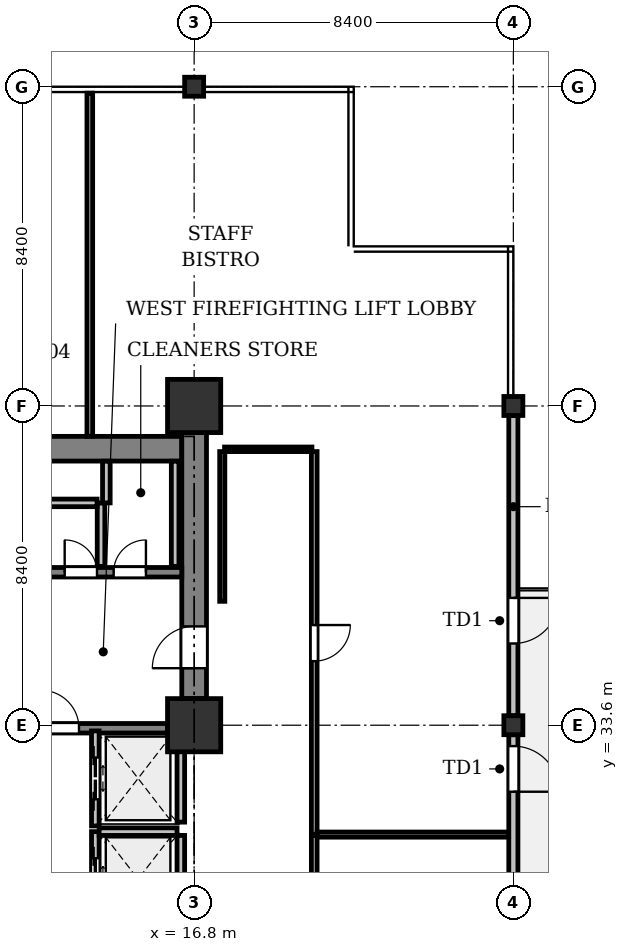
"""IFC4 building model, lengths in metres.
Left out: names, types, materials, properties, quantities, classifications, styles, units other than length and angle.
Written with IfcOpenShell. Run it as: python <this file> out.ifc"""

import sys

from ifc_helpers import new_model, si_unit, direction, frame, frame_2d, origin, origin_2d, place, context, subcontext, project, spatial, rectangle, i_section, extrude, element, fill, save


model = new_model("IFC4")
c1 = context("Model", 3, precision=1e-05, world=origin(), true_north=direction((0.0, 1.0)))
c2 = subcontext(c1, "Body", "Model", "MODEL_VIEW")
j1 = project(units=[si_unit("LENGTHUNIT", "METRE"), si_unit("PLANEANGLEUNIT", "RADIAN")], contexts=[c1])
p1 = place(None, origin())
s1 = spatial("IfcSite", under=j1, at=p1, CompositionType="ELEMENT")
p2 = place(p1, origin())
s2 = spatial("IfcBuilding", under=s1, at=p2, CompositionType="ELEMENT")
p3 = place(p2, frame((0.0, 0.0, 50.0)))
s3 = spatial("IfcBuildingStorey", under=s2, at=p3, CompositionType="ELEMENT", Elevation=50.0)
for number, where, z_axis, x_axis in (
    (1, (16.8, 33.6, 0.0), (0.0, 0.0, 1.0), (1.0, 0.0, 0.0)),
    (2, (16.8, 42.0, 0.0), (0.0, 0.0, 1.0), (1.0, 0.0, 0.0)),
):
    element("IfcColumn", number, at=place(p3, frame(where, z_axis=z_axis, x_axis=x_axis)), inside=s3, PredefinedType="COLUMN", context=c2, shape_type="SweptSolid", body=[
        extrude(rectangle(XDim=1.4, YDim=1.4, at=origin_2d()), origin(), (0.0, 0.0, 1.0), 4.2),
    ])
for number, where, z_axis, x_axis in (
    (3, (16.8, 50.4, 0.0), (0.0, 0.0, 1.0), (1.0, 0.0, 0.0)),
    (4, (25.2, 33.6, 0.0), (0.0, 0.0, 1.0), (1.0, 0.0, 0.0)),
    (5, (25.2, 42.0, 0.0), (0.0, 0.0, 1.0), (1.0, 0.0, 0.0)),
):
    element("IfcColumn", number, at=place(p3, frame(where, z_axis=z_axis, x_axis=x_axis)), inside=s3, PredefinedType="COLUMN", context=c2, shape_type="SweptSolid", body=[
        extrude(i_section(OverallWidth=0.5, OverallDepth=0.5, WebThickness=0.028, FlangeThickness=0.04, at=origin_2d()), origin(), (0.0, 0.0, 1.0), 4.2),
    ])
p4 = place(p3, frame((25.2, 41.75, 0.0), z_axis=(0.0, 0.0, 1.0), x_axis=(0.0, -1.0, 0.0)))
e6 = element("IfcWall", 6, at=p4, inside=s3, PredefinedType="STANDARD", context=c2, shape_type="SweptSolid", body=[
    extrude(rectangle(XDim=7.9, YDim=0.24, at=frame_2d((3.95, 0.0))), origin(), (0.0, 0.0, 1.0), 3.471),
])
p5 = place(p4, frame((4.8, 0.0, 0.0)))
e7 = element("IfcOpeningElement", 7, at=p5, cuts=e6, PredefinedType="OPENING", context=c2, shape_type="SweptSolid", body=[
    extrude(rectangle(XDim=1.2, YDim=2.2, at=frame_2d((0.6, 1.1))), frame((0.0, 0.13, 0.0), z_axis=(0.0, -1.0, 0.0), x_axis=(1.0, 0.0, 0.0)), (0.0, 0.0, 1.0), 0.26),
])
p6 = place(p3, frame((25.2, 33.35, 0.0), z_axis=(0.0, 0.0, 1.0), x_axis=(0.0, -1.0, 0.0)))
e8 = element("IfcWall", 8, at=p6, inside=s3, PredefinedType="STANDARD", context=c2, shape_type="SweptSolid", body=[
    extrude(rectangle(XDim=7.9, YDim=0.24, at=frame_2d((3.95, 0.0))), origin(), (0.0, 0.0, 1.0), 3.471),
])
p7 = place(p6, frame((0.3, 0.0, 0.0)))
e9 = element("IfcOpeningElement", 9, at=p7, cuts=e8, PredefinedType="OPENING", context=c2, shape_type="SweptSolid", body=[
    extrude(rectangle(XDim=1.2, YDim=2.2, at=frame_2d((0.6, 1.1))), frame((0.0, 0.13, 0.0), z_axis=(0.0, -1.0, 0.0), x_axis=(1.0, 0.0, 0.0)), (0.0, 0.0, 1.0), 0.26),
])
p8 = place(p6, frame((4.329, 0.0, 0.9)))
e10 = element("IfcOpeningElement", 10, at=p8, cuts=e8, PredefinedType="OPENING", context=c2, shape_type="SweptSolid", body=[
    extrude(rectangle(XDim=1.8, YDim=1.6, at=frame_2d((0.9, 0.8))), frame((0.0, 0.13, 0.0), z_axis=(0.0, -1.0, 0.0), x_axis=(1.0, 0.0, 0.0)), (0.0, 0.0, 1.0), 0.26),
])
p9 = place(p3, frame((8.725, 40.875, 0.0), z_axis=(0.0, 0.0, 1.0), x_axis=(1.0, 0.0, 0.0)))
e11 = element("IfcWall", 11, at=p9, inside=s3, PredefinedType="SHEAR", context=c2, shape_type="SweptSolid", body=[
    extrude(rectangle(XDim=7.75, YDim=0.65, at=frame_2d((3.875, 0.0))), origin(), (0.0, 0.0, 1.0), 3.925),
])
p10 = place(p3, frame((16.8, 34.3, 0.0), z_axis=(0.0, 0.0, 1.0), x_axis=(0.0, 1.0, 0.0)))
e12 = element("IfcWall", 12, at=p10, inside=s3, PredefinedType="SHEAR", context=c2, shape_type="SweptSolid", body=[
    extrude(rectangle(XDim=7.0, YDim=0.65, at=frame_2d((3.5, 0.0))), origin(), (0.0, 0.0, 1.0), 3.925),
])
p11 = place(p10, frame((0.8, 0.0, 0.0)))
e13 = element("IfcOpeningElement", 13, at=p11, cuts=e12, PredefinedType="OPENING", context=c2, shape_type="SweptSolid", body=[
    extrude(rectangle(XDim=1.1, YDim=2.15, at=frame_2d((0.55, 1.075))), frame((0.0, 0.335, 0.0), z_axis=(0.0, -1.0, 0.0), x_axis=(1.0, 0.0, 0.0)), (0.0, 0.0, 1.0), 0.67),
])
p12 = place(p3, frame((12.45, 33.52, 0.0), z_axis=(0.0, 0.0, 1.0), x_axis=(1.0, 0.0, 0.0)))
e14 = element("IfcWall", 14, at=p12, inside=s3, PredefinedType="SHEAR", context=c2, shape_type="SweptSolid", body=[
    extrude(rectangle(XDim=3.65, YDim=0.25, at=frame_2d((1.825, 0.0))), origin(), (0.0, 0.0, 1.0), 3.925),
])
p13 = place(p12, frame((0.32, 0.0, 0.0)))
e15 = element("IfcOpeningElement", 15, at=p13, cuts=e14, PredefinedType="OPENING", context=c2, shape_type="SweptSolid", body=[
    extrude(rectangle(XDim=1.0, YDim=2.15, at=frame_2d((0.5, 1.075))), frame((0.0, 0.135, 0.0), z_axis=(0.0, -1.0, 0.0), x_axis=(1.0, 0.0, 0.0)), (0.0, 0.0, 1.0), 0.27),
])
p14 = place(p3, frame((12.45, 37.625, 0.0), z_axis=(0.0, 0.0, 1.0), x_axis=(1.0, 0.0, 0.0)))
e16 = element("IfcWall", 16, at=p14, inside=s3, PredefinedType="SHEAR", context=c2, shape_type="SweptSolid", body=[
    extrude(rectangle(XDim=4.025, YDim=0.25, at=frame_2d((2.013, 0.0))), origin(), (0.0, 0.0, 1.0), 3.925),
])
p15 = place(p14, frame((0.944, 0.0, 0.0)))
e17 = element("IfcOpeningElement", 17, at=p15, cuts=e16, PredefinedType="OPENING", context=c2, shape_type="SweptSolid", body=[
    extrude(rectangle(XDim=0.85, YDim=2.15, at=frame_2d((0.425, 1.075))), frame((0.0, 0.135, 0.0), z_axis=(0.0, -1.0, 0.0), x_axis=(1.0, 0.0, 0.0)), (0.0, 0.0, 1.0), 0.27),
])
p16 = place(p14, frame((2.231, 0.0, 0.0)))
e18 = element("IfcOpeningElement", 18, at=p16, cuts=e16, PredefinedType="OPENING", context=c2, shape_type="SweptSolid", body=[
    extrude(rectangle(XDim=0.85, YDim=2.15, at=frame_2d((0.425, 1.075))), frame((0.0, 0.135, 0.0), z_axis=(0.0, -1.0, 0.0), x_axis=(1.0, 0.0, 0.0)), (0.0, 0.0, 1.0), 0.27),
])
p17 = place(p3, frame((14.2, 28.3, 0.0), z_axis=(0.0, 0.0, 1.0), x_axis=(0.0, 1.0, 0.0)))
e19 = element("IfcWall", 19, at=p17, inside=s3, PredefinedType="PARTITIONING", context=c2, shape_type="SweptSolid", body=[
    extrude(rectangle(XDim=2.5, YDim=0.2, at=frame_2d((1.25, 0.0))), origin(), (0.0, 0.0, 1.0), 3.925),
])
p18 = place(p17, frame((0.7, 0.0, 0.0)))
e20 = element("IfcOpeningElement", 20, at=p18, cuts=e19, PredefinedType="OPENING", context=c2, shape_type="SweptSolid", body=[
    extrude(rectangle(XDim=1.1, YDim=2.2, at=frame_2d((0.55, 1.1))), frame((0.0, 0.11, 0.0), z_axis=(0.0, -1.0, 0.0), x_axis=(1.0, 0.0, 0.0)), (0.0, 0.0, 1.0), 0.22),
])
p19 = place(p3, frame((16.45, 28.4, 0.0), z_axis=(0.0, 0.0, 1.0), x_axis=(0.0, 1.0, 0.0)))
e21 = element("IfcWall", 21, at=p19, inside=s3, PredefinedType="PARTITIONING", context=c2, shape_type="SweptSolid", body=[
    extrude(rectangle(XDim=2.3, YDim=0.2, at=frame_2d((1.15, 0.0))), origin(), (0.0, 0.0, 1.0), 3.925),
])
p20 = place(p3, frame((14.3, 30.8, 0.0), z_axis=(0.0, 0.0, 1.0), x_axis=(1.0, 0.0, 0.0)))
e22 = element("IfcWall", 22, at=p20, inside=s3, PredefinedType="PARTITIONING", context=c2, shape_type="SweptSolid", body=[
    extrude(rectangle(XDim=2.05, YDim=0.2, at=frame_2d((1.025, 0.0))), origin(), (0.0, 0.0, 1.0), 3.925),
])
p21 = place(p3, frame((14.2, 30.95, 0.0), z_axis=(0.0, 0.0, 1.0), x_axis=(0.0, 1.0, 0.0)))
e23 = element("IfcWall", 23, at=p21, inside=s3, PredefinedType="PARTITIONING", context=c2, shape_type="SweptSolid", body=[
    extrude(rectangle(XDim=2.5, YDim=0.2, at=frame_2d((1.25, 0.0))), origin(), (0.0, 0.0, 1.0), 3.925),
])
p22 = place(p21, frame((0.7, 0.0, 0.0)))
e24 = element("IfcOpeningElement", 24, at=p22, cuts=e23, PredefinedType="OPENING", context=c2, shape_type="SweptSolid", body=[
    extrude(rectangle(XDim=1.1, YDim=2.2, at=frame_2d((0.55, 1.1))), frame((0.0, 0.11, 0.0), z_axis=(0.0, -1.0, 0.0), x_axis=(1.0, 0.0, 0.0)), (0.0, 0.0, 1.0), 0.22),
])
p23 = place(p3, frame((16.45, 31.05, 0.0), z_axis=(0.0, 0.0, 1.0), x_axis=(0.0, 1.0, 0.0)))
e25 = element("IfcWall", 25, at=p23, inside=s3, PredefinedType="PARTITIONING", context=c2, shape_type="SweptSolid", body=[
    extrude(rectangle(XDim=2.3, YDim=0.2, at=frame_2d((1.15, 0.0))), origin(), (0.0, 0.0, 1.0), 3.925),
])
p24 = place(p3, frame((14.35, 37.78, 0.0), z_axis=(0.0, 0.0, 1.0), x_axis=(0.0, 1.0, 0.0)))
e26 = element("IfcWall", 26, at=p24, inside=s3, PredefinedType="PARTITIONING", context=c2, shape_type="SweptSolid", body=[
    extrude(rectangle(XDim=1.67, YDim=0.2, at=frame_2d((0.835, 0.0))), origin(), (0.0, 0.0, 1.0), 2.825),
])
p25 = place(p3, frame((14.246, 39.45, 0.0), z_axis=(0.0, 0.0, 1.0), x_axis=(-1.0, 0.0, 0.0)))
e27 = element("IfcWall", 27, at=p25, inside=s3, PredefinedType="PARTITIONING", context=c2, shape_type="SweptSolid", body=[
    extrude(rectangle(XDim=1.796, YDim=0.2, at=frame_2d((0.898, 0.0))), origin(), (0.0, 0.0, 1.0), 2.825),
])
p26 = place(p3, frame((16.3, 37.78, 0.0), z_axis=(0.0, 0.0, 1.0), x_axis=(0.0, 1.0, 0.0)))
e28 = element("IfcWall", 28, at=p26, inside=s3, PredefinedType="PARTITIONING", context=c2, shape_type="SweptSolid", body=[
    extrude(rectangle(XDim=2.766, YDim=0.2, at=frame_2d((1.383, 0.0))), origin(), (0.0, 0.0, 1.0), 2.825),
])
p27 = place(p3, frame((14.49, 40.546, 0.0), z_axis=(0.0, 0.0, 1.0), x_axis=(0.0, -1.0, 0.0)))
e29 = element("IfcWall", 29, at=p27, inside=s3, PredefinedType="PARTITIONING", context=c2, shape_type="SweptSolid", body=[
    extrude(rectangle(XDim=1.096, YDim=0.2, at=frame_2d((0.548, 0.0))), origin(), (0.0, 0.0, 1.0), 2.825),
])
p28 = place(p3, frame((19.96, 40.8, 0.0), z_axis=(0.0, 0.0, 1.0), x_axis=(0.0, -1.0, 0.0)))
e30 = element("IfcWall", 30, at=p28, inside=s3, PredefinedType="PARTITIONING", context=c2, shape_type="SweptSolid", body=[
    extrude(rectangle(XDim=10.078, YDim=0.15, at=frame_2d((5.039, 0.0))), origin(), (0.0, 0.0, 1.0), 3.313),
])
p29 = place(p28, frame((4.564, 0.0, 0.0)))
e31 = element("IfcOpeningElement", 31, at=p29, cuts=e30, PredefinedType="OPENING", context=c2, shape_type="SweptSolid", body=[
    extrude(rectangle(XDim=0.95, YDim=2.15, at=frame_2d((0.475, 1.075))), frame((0.0, 0.085, 0.0), z_axis=(0.0, -1.0, 0.0), x_axis=(1.0, 0.0, 0.0)), (0.0, 0.0, 1.0), 0.17),
])
p30 = place(p3, frame((20.039, 30.722, 0.0), z_axis=(0.0, 0.0, 1.0), x_axis=(1.0, 0.0, 0.0)))
e32 = element("IfcWall", 32, at=p30, inside=s3, PredefinedType="PARTITIONING", context=c2, shape_type="SweptSolid", body=[
    extrude(rectangle(XDim=5.037, YDim=0.135, at=frame_2d((2.519, 0.0))), origin(), (0.0, 0.0, 1.0), 3.566),
])
p31 = place(p3, frame((14.055, 50.231, 0.0), z_axis=(0.0, 0.0, 1.0), x_axis=(0.0, -1.0, 0.0)))
e33 = element("IfcWall", 33, at=p31, inside=s3, PredefinedType="PARTITIONING", context=c2, shape_type="SweptSolid", body=[
    extrude(rectangle(XDim=9.027, YDim=0.15, at=frame_2d((4.513, 0.0))), origin(), (0.0, 0.0, 1.0), 3.313),
])
p32 = place(p3, frame((17.54, 36.86, 0.0), z_axis=(0.0, 0.0, 1.0), x_axis=(0.0, 1.0, 0.0)))
e34 = element("IfcWall", 34, at=p32, inside=s3, PredefinedType="PARTITIONING", context=c2, shape_type="SweptSolid", body=[
    extrude(rectangle(XDim=3.94, YDim=0.135, at=frame_2d((1.97, 0.0))), origin(), (0.0, 0.0, 1.0), 3.925),
])
p33 = place(p3, frame((17.6, 40.86, 0.0), z_axis=(0.0, 0.0, 1.0), x_axis=(1.0, 0.0, 0.0)))
e35 = element("IfcWall", 35, at=p33, inside=s3, PredefinedType="PARTITIONING", context=c2, shape_type="SweptSolid", body=[
    extrude(rectangle(XDim=2.3, YDim=0.12, at=frame_2d((1.15, 0.0))), origin(), (0.0, 0.0, 1.0), 3.925),
])
p34 = place(p3, frame((19.96, 30.702, 0.0), z_axis=(0.0, 0.0, 1.0), x_axis=(0.0, -1.0, 0.0)))
e36 = element("IfcWall", 36, at=p34, inside=s3, PredefinedType="PARTITIONING", context=c2, shape_type="SweptSolid", body=[
    extrude(rectangle(XDim=10.392, YDim=0.15, at=frame_2d((5.196, 0.0))), origin(), (0.0, 0.0, 1.0), 3.313),
])
p35 = place(p5, origin())
e37 = element("IfcDoor", 37, at=p35, inside=s3, OperationType="SINGLE_SWING_LEFT", PredefinedType="DOOR", context=c2, shape_type="SweptSolid", body=[
    extrude(rectangle(XDim=1.2, YDim=2.2, at=frame_2d((0.6, 1.1))), frame((0.0, 0.025, 0.0), z_axis=(0.0, -1.0, 0.0), x_axis=(1.0, 0.0, 0.0)), (0.0, 0.0, 1.0), 0.05),
])
fill(e7, e37)
p36 = place(p7, origin())
e38 = element("IfcDoor", 38, at=p36, inside=s3, OperationType="SINGLE_SWING_RIGHT", PredefinedType="DOOR", context=c2, shape_type="SweptSolid", body=[
    extrude(rectangle(XDim=1.2, YDim=2.2, at=frame_2d((0.6, 1.1))), frame((0.0, 0.025, 0.0), z_axis=(0.0, -1.0, 0.0), x_axis=(1.0, 0.0, 0.0)), (0.0, 0.0, 1.0), 0.05),
])
fill(e9, e38)
p37 = place(p11, origin())
e39 = element("IfcDoor", 39, at=p37, inside=s3, OperationType="SINGLE_SWING_LEFT", PredefinedType="DOOR", context=c2, shape_type="SweptSolid", body=[
    extrude(rectangle(XDim=1.1, YDim=2.15, at=frame_2d((0.55, 1.075))), frame((0.0, 0.025, 0.0), z_axis=(0.0, -1.0, 0.0), x_axis=(1.0, 0.0, 0.0)), (0.0, 0.0, 1.0), 0.05),
])
fill(e13, e39)
p38 = place(p13, origin())
e40 = element("IfcDoor", 40, at=p38, inside=s3, OperationType="SINGLE_SWING_LEFT", PredefinedType="DOOR", context=c2, shape_type="SweptSolid", body=[
    extrude(rectangle(XDim=1.0, YDim=2.15, at=frame_2d((0.5, 1.075))), frame((0.0, 0.025, 0.0), z_axis=(0.0, -1.0, 0.0), x_axis=(1.0, 0.0, 0.0)), (0.0, 0.0, 1.0), 0.05),
])
fill(e15, e40)
p39 = place(p18, origin())
e41 = element("IfcDoor", 41, at=p39, inside=s3, OperationType="DOUBLE_DOOR_SLIDING", PredefinedType="DOOR", context=c2, shape_type="SweptSolid", body=[
    extrude(rectangle(XDim=1.1, YDim=2.2, at=frame_2d((0.55, 1.1))), frame((0.0, 0.025, 0.0), z_axis=(0.0, -1.0, 0.0), x_axis=(1.0, 0.0, 0.0)), (0.0, 0.0, 1.0), 0.05),
])
fill(e20, e41)
p40 = place(p22, origin())
e42 = element("IfcDoor", 42, at=p40, inside=s3, OperationType="DOUBLE_DOOR_SLIDING", PredefinedType="DOOR", context=c2, shape_type="SweptSolid", body=[
    extrude(rectangle(XDim=1.1, YDim=2.2, at=frame_2d((0.55, 1.1))), frame((0.0, 0.025, 0.0), z_axis=(0.0, -1.0, 0.0), x_axis=(1.0, 0.0, 0.0)), (0.0, 0.0, 1.0), 0.05),
])
fill(e24, e42)
p41 = place(p15, origin())
e43 = element("IfcDoor", 43, at=p41, inside=s3, OperationType="SINGLE_SWING_LEFT", PredefinedType="DOOR", context=c2, shape_type="SweptSolid", body=[
    extrude(rectangle(XDim=0.85, YDim=2.15, at=frame_2d((0.425, 1.075))), frame((0.0, 0.025, 0.0), z_axis=(0.0, -1.0, 0.0), x_axis=(1.0, 0.0, 0.0)), (0.0, 0.0, 1.0), 0.05),
])
fill(e17, e43)
p42 = place(p16, origin())
e44 = element("IfcDoor", 44, at=p42, inside=s3, OperationType="SINGLE_SWING_RIGHT", PredefinedType="DOOR", context=c2, shape_type="SweptSolid", body=[
    extrude(rectangle(XDim=0.85, YDim=2.15, at=frame_2d((0.425, 1.075))), frame((0.0, 0.025, 0.0), z_axis=(0.0, -1.0, 0.0), x_axis=(1.0, 0.0, 0.0)), (0.0, 0.0, 1.0), 0.05),
])
fill(e18, e44)
p43 = place(p29, origin())
e45 = element("IfcDoor", 45, at=p43, inside=s3, OperationType="SINGLE_SWING_LEFT", PredefinedType="DOOR", context=c2, shape_type="SweptSolid", body=[
    extrude(rectangle(XDim=0.95, YDim=2.15, at=frame_2d((0.475, 1.075))), frame((0.0, 0.025, 0.0), z_axis=(0.0, -1.0, 0.0), x_axis=(1.0, 0.0, 0.0)), (0.0, 0.0, 1.0), 0.05),
])
fill(e31, e45)
save(model, sys.argv[1])
